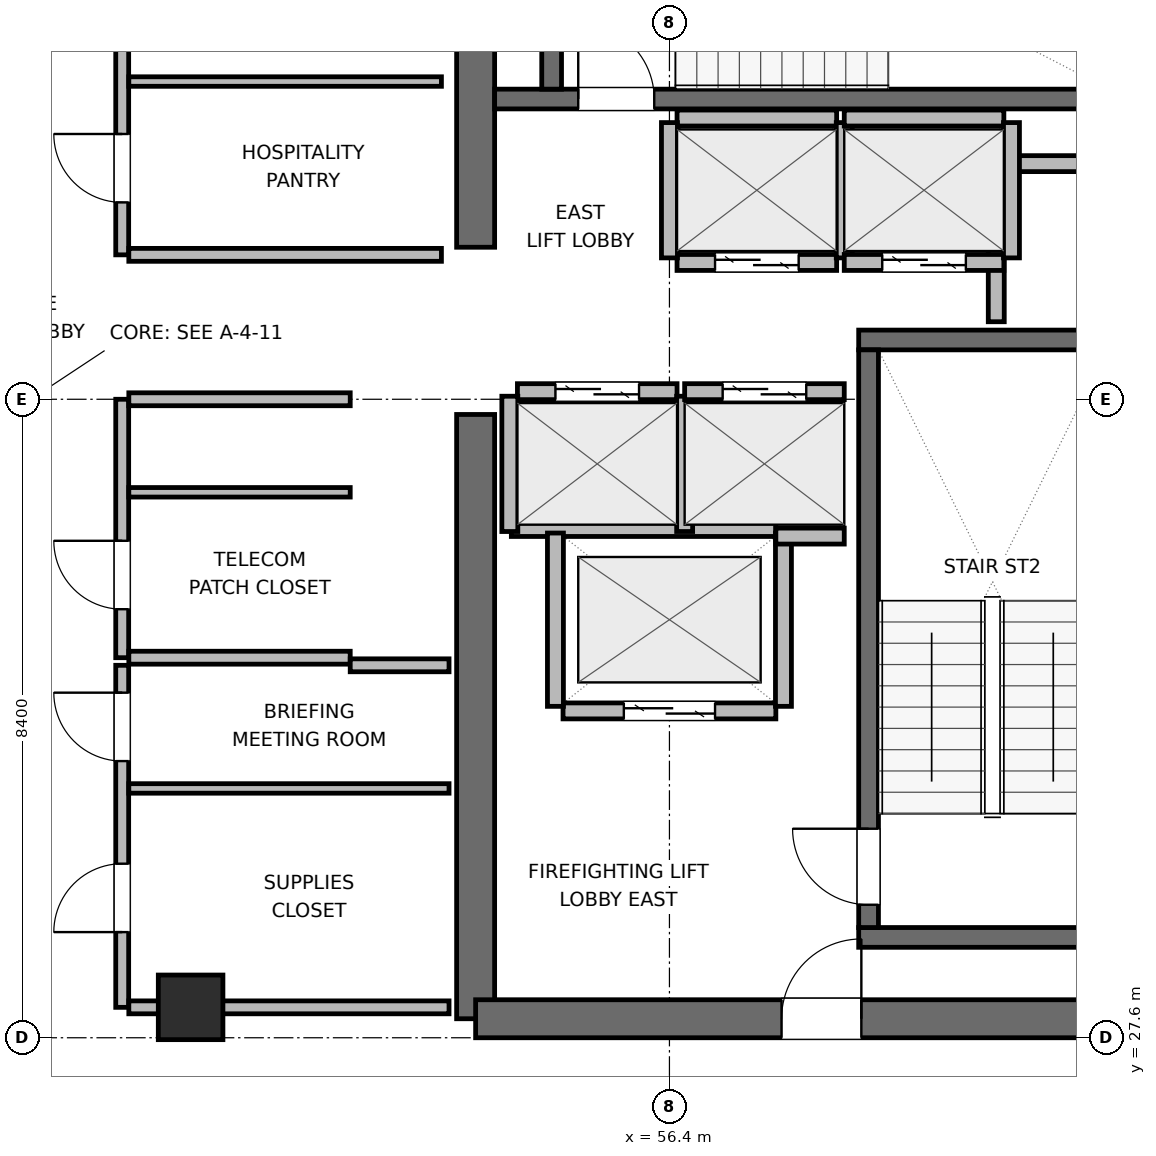
"""IFC4 building model, lengths in metres.
Left out: names, types, materials, properties, quantities, classifications, styles, units other than length and angle.
Written with IfcOpenShell. Run it as: python <this file> out.ifc"""

import sys

from ifc_helpers import new_model, si_unit, direction, frame, frame_2d, origin, origin_2d, place, context, subcontext, project, spatial, rectangle, extrude, element, fill, save


model = new_model("IFC4")
c1 = context("Model", 3, precision=1e-05, world=origin(), true_north=direction((0.0, 1.0)))
c2 = subcontext(c1, "Body", "Model", "MODEL_VIEW")
j1 = project(units=[si_unit("LENGTHUNIT", "METRE"), si_unit("PLANEANGLEUNIT", "RADIAN")], contexts=[c1])
p1 = place(None, origin())
s1 = spatial("IfcSite", under=j1, at=p1, CompositionType="ELEMENT")
p2 = place(p1, origin())
s2 = spatial("IfcBuilding", under=s1, at=p2, CompositionType="ELEMENT")
p3 = place(p2, frame((0.0, 0.0, 274.5)))
s3 = spatial("IfcBuildingStorey", under=s2, at=p3, CompositionType="ELEMENT", Elevation=274.5)
p4 = place(p3, frame((53.85, 27.85, 0.0), z_axis=(0.0, 0.0, 1.0), x_axis=(0.0, 1.0, 0.0)))
e1 = element("IfcWall", 1, at=p4, inside=s3, PredefinedType="SHEAR", context=c2, shape_type="SweptSolid", body=[
    extrude(rectangle(XDim=7.95, YDim=0.5, at=frame_2d((3.975, 0.0))), origin(), (0.0, 0.0, 1.0), 3.9),
])
p5 = place(p3, frame((53.85, 38.0, 0.0), z_axis=(0.0, 0.0, 1.0), x_axis=(0.0, 1.0, 0.0)))
e2 = element("IfcWall", 2, at=p5, inside=s3, PredefinedType="SHEAR", context=c2, shape_type="SweptSolid", body=[
    extrude(rectangle(XDim=6.15, YDim=0.5, at=frame_2d((3.075, 0.0))), origin(), (0.0, 0.0, 1.0), 3.9),
])
p6 = place(p3, frame((53.85, 27.85, 0.0), z_axis=(0.0, 0.0, 1.0), x_axis=(1.0, 0.0, 0.0)))
e3 = element("IfcWall", 3, at=p6, inside=s3, PredefinedType="SHEAR", context=c2, shape_type="SweptSolid", body=[
    extrude(rectangle(XDim=9.5, YDim=0.5, at=frame_2d((4.75, 0.0))), origin(), (0.0, 0.0, 1.0), 3.9),
])
p7 = place(p6, frame((4.025, 0.0, 0.0)))
e4 = element("IfcOpeningElement", 4, at=p7, cuts=e3, PredefinedType="OPENING", context=c2, shape_type="SweptSolid", body=[
    extrude(rectangle(XDim=1.05, YDim=2.04, at=frame_2d((0.525, 1.02))), frame((0.0, 0.26, 0.0), z_axis=(0.0, -1.0, 0.0), x_axis=(1.0, 0.0, 0.0)), (0.0, 0.0, 1.0), 0.52),
])
for number, where, z_axis, x_axis in (
    (5, (58.89, 28.92, 0.0), (0.0, 0.0, 1.0), (1.0, 0.0, 0.0)),
    (6, (58.89, 36.78, 0.0), (0.0, 0.0, 1.0), (1.0, 0.0, 0.0)),
):
    element("IfcWall", number, at=place(p3, frame(where, z_axis=z_axis, x_axis=x_axis)), inside=s3, PredefinedType="SHEAR", context=c2, shape_type="SweptSolid", body=[
        extrude(rectangle(XDim=4.21, YDim=0.26, at=frame_2d((2.105, 0.0))), origin(), (0.0, 0.0, 1.0), 3.9),
    ])
p8 = place(p3, frame((59.02, 29.05, 0.0), z_axis=(0.0, 0.0, 1.0), x_axis=(0.0, 1.0, 0.0)))
e7 = element("IfcWall", 7, at=p8, inside=s3, PredefinedType="SHEAR", context=c2, shape_type="SweptSolid", body=[
    extrude(rectangle(XDim=7.6, YDim=0.26, at=frame_2d((3.8, 0.0))), origin(), (0.0, 0.0, 1.0), 3.9),
])
p9 = place(p8, frame((0.3, 0.0, 0.0)))
e8 = element("IfcOpeningElement", 8, at=p9, cuts=e7, PredefinedType="OPENING", context=c2, shape_type="SweptSolid", body=[
    extrude(rectangle(XDim=1.0, YDim=2.04, at=frame_2d((0.5, 1.02))), frame((0.0, 0.14, 0.0), z_axis=(0.0, -1.0, 0.0), x_axis=(1.0, 0.0, 0.0)), (0.0, 0.0, 1.0), 0.28),
])
p10 = place(p3, frame((54.1, 39.95, 0.0), z_axis=(0.0, 0.0, 1.0), x_axis=(1.0, 0.0, 0.0)))
e9 = element("IfcWall", 9, at=p10, inside=s3, PredefinedType="SHEAR", context=c2, shape_type="SweptSolid", body=[
    extrude(rectangle(XDim=9.0, YDim=0.26, at=frame_2d((4.5, 0.0))), origin(), (0.0, 0.0, 1.0), 3.9),
])
p11 = place(p10, frame((1.1, 0.0, 0.0)))
e10 = element("IfcOpeningElement", 10, at=p11, cuts=e9, PredefinedType="OPENING", context=c2, shape_type="SweptSolid", body=[
    extrude(rectangle(XDim=1.0, YDim=2.04, at=frame_2d((0.5, 1.02))), frame((0.0, 0.14, 0.0), z_axis=(0.0, -1.0, 0.0), x_axis=(1.0, 0.0, 0.0)), (0.0, 0.0, 1.0), 0.28),
])
p12 = place(p3, frame((54.85, 40.08, 0.0), z_axis=(0.0, 0.0, 1.0), x_axis=(0.0, 1.0, 0.0)))
e11 = element("IfcWall", 11, at=p12, inside=s3, PredefinedType="SHEAR", context=c2, shape_type="SweptSolid", body=[
    extrude(rectangle(XDim=2.94, YDim=0.26, at=frame_2d((1.47, 0.0))), origin(), (0.0, 0.0, 1.0), 3.9),
])
p13 = place(p3, frame((50.1, 28.0, 0.0), z_axis=(0.0, 0.0, 1.0), x_axis=(1.0, 0.0, 0.0)))
e12 = element("IfcColumn", 12, at=p13, inside=s3, PredefinedType="COLUMN", context=c2, shape_type="SweptSolid", body=[
    extrude(rectangle(XDim=0.85, YDim=0.85, at=origin_2d()), origin(), (0.0, 0.0, 1.0), 3.9),
])
p14 = place(p3, frame((60.72, 39.1, 0.0), z_axis=(0.0, 0.0, 1.0), x_axis=(1.0, 0.0, 0.0)))
e13 = element("IfcWall", 13, at=p14, inside=s3, PredefinedType="PARTITIONING", context=c2, shape_type="SweptSolid", body=[
    extrude(rectangle(XDim=1.8, YDim=0.21, at=frame_2d((0.9, 0.0))), origin(), (0.0, 0.0, 1.0), 3.68),
])
p15 = place(p3, frame((60.7, 37.02, 0.0), z_axis=(0.0, 0.0, 1.0), x_axis=(0.0, 1.0, 0.0)))
e14 = element("IfcWall", 14, at=p15, inside=s3, PredefinedType="PARTITIONING", context=c2, shape_type="SweptSolid", body=[
    extrude(rectangle(XDim=1.96, YDim=0.21, at=frame_2d((0.98, 0.0))), origin(), (0.0, 0.0, 1.0), 3.68),
])
p16 = place(p3, frame((55.0, 31.9, 0.0), z_axis=(0.0, 0.0, 1.0), x_axis=(1.0, 0.0, 0.0)))
e15 = element("IfcWall", 15, at=p16, inside=s3, PredefinedType="PARTITIONING", context=c2, shape_type="SweptSolid", body=[
    extrude(rectangle(XDim=2.8, YDim=0.21, at=frame_2d((1.4, 0.0))), origin(), (0.0, 0.0, 1.0), 3.68),
])
p17 = place(p16, frame((0.8, 0.0, 0.0)))
e16 = element("IfcOpeningElement", 16, at=p17, cuts=e15, PredefinedType="OPENING", context=c2, shape_type="SweptSolid", body=[
    extrude(rectangle(XDim=1.2, YDim=2.04, at=frame_2d((0.6, 1.02))), frame((0.0, 0.115, 0.0), z_axis=(0.0, -1.0, 0.0), x_axis=(1.0, 0.0, 0.0)), (0.0, 0.0, 1.0), 0.23),
])
p18 = place(p3, frame((54.32, 34.3, 0.0), z_axis=(0.0, 0.0, 1.0), x_axis=(1.0, 0.0, 0.0)))
e17 = element("IfcWall", 17, at=p18, inside=s3, PredefinedType="PARTITIONING", context=c2, shape_type="SweptSolid", body=[
    extrude(rectangle(XDim=3.48, YDim=0.21, at=frame_2d((1.74, 0.0))), origin(), (0.0, 0.0, 1.0), 3.68),
])
for number, where, z_axis, x_axis in (
    (18, (54.9, 31.96, 0.0), (0.0, 0.0, 1.0), (0.0, 1.0, 0.0)),
    (19, (57.9, 31.96, 0.0), (0.0, 0.0, 1.0), (0.0, 1.0, 0.0)),
):
    element("IfcWall", number, at=place(p3, frame(where, z_axis=z_axis, x_axis=x_axis)), inside=s3, PredefinedType="PARTITIONING", context=c2, shape_type="SweptSolid", body=[
        extrude(rectangle(XDim=2.28, YDim=0.21, at=frame_2d((1.14, 0.0))), origin(), (0.0, 0.0, 1.0), 3.68),
    ])
p19 = place(p3, frame((54.4, 36.1, 0.0), z_axis=(0.0, 0.0, 1.0), x_axis=(1.0, 0.0, 0.0)))
e20 = element("IfcWall", 20, at=p19, inside=s3, PredefinedType="PARTITIONING", context=c2, shape_type="SweptSolid", body=[
    extrude(rectangle(XDim=2.1, YDim=0.21, at=frame_2d((1.05, 0.0))), origin(), (0.0, 0.0, 1.0), 3.68),
])
p20 = place(p19, frame((0.5, 0.0, 0.0)))
e21 = element("IfcOpeningElement", 21, at=p20, cuts=e20, PredefinedType="OPENING", context=c2, shape_type="SweptSolid", body=[
    extrude(rectangle(XDim=1.1, YDim=2.04, at=frame_2d((0.55, 1.02))), frame((0.0, 0.115, 0.0), z_axis=(0.0, -1.0, 0.0), x_axis=(1.0, 0.0, 0.0)), (0.0, 0.0, 1.0), 0.23),
])
for number, where, z_axis, x_axis in (
    (22, (54.3, 34.26, 0.0), (0.0, 0.0, 1.0), (0.0, 1.0, 0.0)),
    (23, (56.6, 34.26, 0.0), (0.0, 0.0, 1.0), (0.0, 1.0, 0.0)),
):
    element("IfcWall", number, at=place(p3, frame(where, z_axis=z_axis, x_axis=x_axis)), inside=s3, PredefinedType="PARTITIONING", context=c2, shape_type="SweptSolid", body=[
        extrude(rectangle(XDim=1.78, YDim=0.21, at=frame_2d((0.89, 0.0))), origin(), (0.0, 0.0, 1.0), 3.68),
    ])
p21 = place(p3, frame((56.6, 36.1, 0.0), z_axis=(0.0, 0.0, 1.0), x_axis=(1.0, 0.0, 0.0)))
e24 = element("IfcWall", 24, at=p21, inside=s3, PredefinedType="PARTITIONING", context=c2, shape_type="SweptSolid", body=[
    extrude(rectangle(XDim=2.1, YDim=0.21, at=frame_2d((1.05, 0.0))), origin(), (0.0, 0.0, 1.0), 3.68),
])
p22 = place(p21, frame((0.5, 0.0, 0.0)))
e25 = element("IfcOpeningElement", 25, at=p22, cuts=e24, PredefinedType="OPENING", context=c2, shape_type="SweptSolid", body=[
    extrude(rectangle(XDim=1.1, YDim=2.04, at=frame_2d((0.55, 1.02))), frame((0.0, 0.115, 0.0), z_axis=(0.0, -1.0, 0.0), x_axis=(1.0, 0.0, 0.0)), (0.0, 0.0, 1.0), 0.23),
])
p23 = place(p3, frame((57.8, 34.2, 0.0), z_axis=(0.0, 0.0, 1.0), x_axis=(1.0, 0.0, 0.0)))
e26 = element("IfcWall", 26, at=p23, inside=s3, PredefinedType="PARTITIONING", context=c2, shape_type="SweptSolid", body=[
    extrude(rectangle(XDim=0.9, YDim=0.21, at=frame_2d((0.45, 0.0))), origin(), (0.0, 0.0, 1.0), 3.68),
])
p24 = place(p3, frame((56.5, 37.8, 0.0), z_axis=(0.0, 0.0, 1.0), x_axis=(1.0, 0.0, 0.0)))
e27 = element("IfcWall", 27, at=p24, inside=s3, PredefinedType="PARTITIONING", context=c2, shape_type="SweptSolid", body=[
    extrude(rectangle(XDim=2.1, YDim=0.21, at=frame_2d((1.05, 0.0))), origin(), (0.0, 0.0, 1.0), 3.68),
])
p25 = place(p24, frame((0.5, 0.0, 0.0)))
e28 = element("IfcOpeningElement", 28, at=p25, cuts=e27, PredefinedType="OPENING", context=c2, shape_type="SweptSolid", body=[
    extrude(rectangle(XDim=1.1, YDim=2.04, at=frame_2d((0.55, 1.02))), frame((0.0, 0.115, 0.0), z_axis=(0.0, -1.0, 0.0), x_axis=(1.0, 0.0, 0.0)), (0.0, 0.0, 1.0), 0.23),
])
p26 = place(p3, frame((56.5, 39.7, 0.0), z_axis=(0.0, 0.0, 1.0), x_axis=(1.0, 0.0, 0.0)))
e29 = element("IfcWall", 29, at=p26, inside=s3, PredefinedType="PARTITIONING", context=c2, shape_type="SweptSolid", body=[
    extrude(rectangle(XDim=2.1, YDim=0.21, at=frame_2d((1.05, 0.0))), origin(), (0.0, 0.0, 1.0), 3.68),
])
for number, where, z_axis, x_axis in (
    (30, (56.4, 37.86, 0.0), (0.0, 0.0, 1.0), (0.0, 1.0, 0.0)),
    (31, (58.7, 37.86, 0.0), (0.0, 0.0, 1.0), (0.0, 1.0, 0.0)),
):
    element("IfcWall", number, at=place(p3, frame(where, z_axis=z_axis, x_axis=x_axis)), inside=s3, PredefinedType="PARTITIONING", context=c2, shape_type="SweptSolid", body=[
        extrude(rectangle(XDim=1.78, YDim=0.21, at=frame_2d((0.89, 0.0))), origin(), (0.0, 0.0, 1.0), 3.68),
    ])
p27 = place(p3, frame((58.7, 37.8, 0.0), z_axis=(0.0, 0.0, 1.0), x_axis=(1.0, 0.0, 0.0)))
e32 = element("IfcWall", 32, at=p27, inside=s3, PredefinedType="PARTITIONING", context=c2, shape_type="SweptSolid", body=[
    extrude(rectangle(XDim=2.1, YDim=0.21, at=frame_2d((1.05, 0.0))), origin(), (0.0, 0.0, 1.0), 3.68),
])
p28 = place(p27, frame((0.5, 0.0, 0.0)))
e33 = element("IfcOpeningElement", 33, at=p28, cuts=e32, PredefinedType="OPENING", context=c2, shape_type="SweptSolid", body=[
    extrude(rectangle(XDim=1.1, YDim=2.04, at=frame_2d((0.55, 1.02))), frame((0.0, 0.115, 0.0), z_axis=(0.0, -1.0, 0.0), x_axis=(1.0, 0.0, 0.0)), (0.0, 0.0, 1.0), 0.23),
])
p29 = place(p3, frame((58.7, 39.7, 0.0), z_axis=(0.0, 0.0, 1.0), x_axis=(1.0, 0.0, 0.0)))
e34 = element("IfcWall", 34, at=p29, inside=s3, PredefinedType="PARTITIONING", context=c2, shape_type="SweptSolid", body=[
    extrude(rectangle(XDim=2.1, YDim=0.21, at=frame_2d((1.05, 0.0))), origin(), (0.0, 0.0, 1.0), 3.68),
])
p30 = place(p3, frame((60.9, 37.86, 0.0), z_axis=(0.0, 0.0, 1.0), x_axis=(0.0, 1.0, 0.0)))
e35 = element("IfcWall", 35, at=p30, inside=s3, PredefinedType="PARTITIONING", context=c2, shape_type="SweptSolid", body=[
    extrude(rectangle(XDim=1.78, YDim=0.21, at=frame_2d((0.89, 0.0))), origin(), (0.0, 0.0, 1.0), 3.68),
])
p31 = place(p3, frame((49.2, 32.6, 0.0), z_axis=(0.0, 0.0, 1.0), x_axis=(0.0, 1.0, 0.0)))
e36 = element("IfcWall", 36, at=p31, inside=s3, PredefinedType="PARTITIONING", context=c2, shape_type="SweptSolid", body=[
    extrude(rectangle(XDim=3.4, YDim=0.17, at=frame_2d((1.7, 0.0))), origin(), (0.0, 0.0, 1.0), 3.68),
])
p32 = place(p31, frame((0.638, 0.0, 0.0)))
e37 = element("IfcOpeningElement", 37, at=p32, cuts=e36, PredefinedType="OPENING", context=c2, shape_type="SweptSolid", body=[
    extrude(rectangle(XDim=0.9, YDim=2.02, at=frame_2d((0.45, 1.01))), frame((0.0, 0.095, 0.0), z_axis=(0.0, -1.0, 0.0), x_axis=(1.0, 0.0, 0.0)), (0.0, 0.0, 1.0), 0.19),
])
for number, where, z_axis, x_axis in (
    (38, (49.287, 32.6, 0.0), (0.0, 0.0, 1.0), (1.0, 0.0, 0.0)),
    (39, (49.287, 36.0, 0.0), (0.0, 0.0, 1.0), (1.0, 0.0, 0.0)),
):
    element("IfcWall", number, at=place(p3, frame(where, z_axis=z_axis, x_axis=x_axis)), inside=s3, PredefinedType="PARTITIONING", context=c2, shape_type="SweptSolid", body=[
        extrude(rectangle(XDim=2.913, YDim=0.17, at=frame_2d((1.457, 0.0))), origin(), (0.0, 0.0, 1.0), 3.68),
    ])
p33 = place(p3, frame((49.287, 34.776, 0.0), z_axis=(0.0, 0.0, 1.0), x_axis=(1.0, 0.0, 0.0)))
e40 = element("IfcWall", 40, at=p33, inside=s3, PredefinedType="PARTITIONING", context=c2, shape_type="SweptSolid", body=[
    extrude(rectangle(XDim=2.913, YDim=0.125, at=frame_2d((1.457, 0.0))), origin(), (0.0, 0.0, 1.0), 3.68),
])
p34 = place(p3, frame((49.2, 28.0, 0.0), z_axis=(0.0, 0.0, 1.0), x_axis=(0.0, 1.0, 0.0)))
e41 = element("IfcWall", 41, at=p34, inside=s3, PredefinedType="PARTITIONING", context=c2, shape_type="SweptSolid", body=[
    extrude(rectangle(XDim=4.5, YDim=0.17, at=frame_2d((2.25, 0.0))), origin(), (0.0, 0.0, 1.0), 3.68),
])
p35 = place(p34, frame((0.99, 0.0, 0.0)))
e42 = element("IfcOpeningElement", 42, at=p35, cuts=e41, PredefinedType="OPENING", context=c2, shape_type="SweptSolid", body=[
    extrude(rectangle(XDim=0.9, YDim=2.02, at=frame_2d((0.45, 1.01))), frame((0.0, 0.095, 0.0), z_axis=(0.0, -1.0, 0.0), x_axis=(1.0, 0.0, 0.0)), (0.0, 0.0, 1.0), 0.19),
])
p36 = place(p34, frame((3.24, 0.0, 0.0)))
e43 = element("IfcOpeningElement", 43, at=p36, cuts=e41, PredefinedType="OPENING", context=c2, shape_type="SweptSolid", body=[
    extrude(rectangle(XDim=0.9, YDim=2.02, at=frame_2d((0.45, 1.01))), frame((0.0, 0.095, 0.0), z_axis=(0.0, -1.0, 0.0), x_axis=(1.0, 0.0, 0.0)), (0.0, 0.0, 1.0), 0.19),
])
p37 = place(p3, frame((49.287, 28.0, 0.0), z_axis=(0.0, 0.0, 1.0), x_axis=(1.0, 0.0, 0.0)))
e44 = element("IfcWall", 44, at=p37, inside=s3, PredefinedType="PARTITIONING", context=c2, shape_type="SweptSolid", body=[
    extrude(rectangle(XDim=4.213, YDim=0.17, at=frame_2d((2.106, 0.0))), origin(), (0.0, 0.0, 1.0), 2.765),
])
p38 = place(p3, frame((52.2, 32.5, 0.0), z_axis=(0.0, 0.0, 1.0), x_axis=(1.0, 0.0, 0.0)))
e45 = element("IfcWall", 45, at=p38, inside=s3, PredefinedType="PARTITIONING", context=c2, shape_type="SweptSolid", body=[
    extrude(rectangle(XDim=1.3, YDim=0.17, at=frame_2d((0.65, 0.0))), origin(), (0.0, 0.0, 1.0), 3.68),
])
p39 = place(p3, frame((49.287, 30.88, 0.0), z_axis=(0.0, 0.0, 1.0), x_axis=(1.0, 0.0, 0.0)))
e46 = element("IfcWall", 46, at=p39, inside=s3, PredefinedType="PARTITIONING", context=c2, shape_type="SweptSolid", body=[
    extrude(rectangle(XDim=4.213, YDim=0.125, at=frame_2d((2.106, 0.0))), origin(), (0.0, 0.0, 1.0), 3.68),
])
p40 = place(p3, frame((49.2, 37.9, 0.0), z_axis=(0.0, 0.0, 1.0), x_axis=(0.0, 1.0, 0.0)))
e47 = element("IfcWall", 47, at=p40, inside=s3, PredefinedType="PARTITIONING", context=c2, shape_type="SweptSolid", body=[
    extrude(rectangle(XDim=6.0, YDim=0.17, at=frame_2d((3.0, 0.0))), origin(), (0.0, 0.0, 1.0), 3.68),
])
p41 = place(p40, frame((0.69, 0.0, 0.0)))
e48 = element("IfcOpeningElement", 48, at=p41, cuts=e47, PredefinedType="OPENING", context=c2, shape_type="SweptSolid", body=[
    extrude(rectangle(XDim=0.9, YDim=2.02, at=frame_2d((0.45, 1.01))), frame((0.0, 0.095, 0.0), z_axis=(0.0, -1.0, 0.0), x_axis=(1.0, 0.0, 0.0)), (0.0, 0.0, 1.0), 0.19),
])
p42 = place(p40, frame((3.69, 0.0, 0.0)))
e49 = element("IfcOpeningElement", 49, at=p42, cuts=e47, PredefinedType="OPENING", context=c2, shape_type="SweptSolid", body=[
    extrude(rectangle(XDim=0.9, YDim=2.02, at=frame_2d((0.45, 1.01))), frame((0.0, 0.095, 0.0), z_axis=(0.0, -1.0, 0.0), x_axis=(1.0, 0.0, 0.0)), (0.0, 0.0, 1.0), 0.19),
])
p43 = place(p3, frame((49.287, 37.9, 0.0), z_axis=(0.0, 0.0, 1.0), x_axis=(1.0, 0.0, 0.0)))
e50 = element("IfcWall", 50, at=p43, inside=s3, PredefinedType="PARTITIONING", context=c2, shape_type="SweptSolid", body=[
    extrude(rectangle(XDim=4.113, YDim=0.17, at=frame_2d((2.056, 0.0))), origin(), (0.0, 0.0, 1.0), 3.68),
])
p44 = place(p3, frame((49.287, 40.18, 0.0), z_axis=(0.0, 0.0, 1.0), x_axis=(1.0, 0.0, 0.0)))
e51 = element("IfcWall", 51, at=p44, inside=s3, PredefinedType="PARTITIONING", context=c2, shape_type="SweptSolid", body=[
    extrude(rectangle(XDim=4.113, YDim=0.125, at=frame_2d((2.056, 0.0))), origin(), (0.0, 0.0, 1.0), 3.68),
])
p45 = place(p9, origin())
e52 = element("IfcDoor", 52, at=p45, inside=s3, OperationType="SINGLE_SWING_RIGHT", PredefinedType="DOOR", context=c2, shape_type="SweptSolid", body=[
    extrude(rectangle(XDim=1.0, YDim=2.04, at=frame_2d((0.5, 1.02))), frame((0.0, 0.025, 0.0), z_axis=(0.0, -1.0, 0.0), x_axis=(1.0, 0.0, 0.0)), (0.0, 0.0, 1.0), 0.05),
])
fill(e8, e52)
p46 = place(p11, origin())
e53 = element("IfcDoor", 53, at=p46, inside=s3, OperationType="SINGLE_SWING_LEFT", PredefinedType="DOOR", context=c2, shape_type="SweptSolid", body=[
    extrude(rectangle(XDim=1.0, YDim=2.04, at=frame_2d((0.5, 1.02))), frame((0.0, 0.025, 0.0), z_axis=(0.0, -1.0, 0.0), x_axis=(1.0, 0.0, 0.0)), (0.0, 0.0, 1.0), 0.05),
])
fill(e10, e53)
p47 = place(p17, origin())
e54 = element("IfcDoor", 54, at=p47, inside=s3, OperationType="DOUBLE_DOOR_SLIDING", PredefinedType="DOOR", context=c2, shape_type="SweptSolid", body=[
    extrude(rectangle(XDim=1.2, YDim=2.04, at=frame_2d((0.6, 1.02))), frame((0.0, 0.025, 0.0), z_axis=(0.0, -1.0, 0.0), x_axis=(1.0, 0.0, 0.0)), (0.0, 0.0, 1.0), 0.05),
])
fill(e16, e54)
p48 = place(p20, origin())
e55 = element("IfcDoor", 55, at=p48, inside=s3, OperationType="DOUBLE_DOOR_SLIDING", PredefinedType="DOOR", context=c2, shape_type="SweptSolid", body=[
    extrude(rectangle(XDim=1.1, YDim=2.04, at=frame_2d((0.55, 1.02))), frame((0.0, 0.025, 0.0), z_axis=(0.0, -1.0, 0.0), x_axis=(1.0, 0.0, 0.0)), (0.0, 0.0, 1.0), 0.05),
])
fill(e21, e55)
p49 = place(p22, origin())
e56 = element("IfcDoor", 56, at=p49, inside=s3, OperationType="DOUBLE_DOOR_SLIDING", PredefinedType="DOOR", context=c2, shape_type="SweptSolid", body=[
    extrude(rectangle(XDim=1.1, YDim=2.04, at=frame_2d((0.55, 1.02))), frame((0.0, 0.025, 0.0), z_axis=(0.0, -1.0, 0.0), x_axis=(1.0, 0.0, 0.0)), (0.0, 0.0, 1.0), 0.05),
])
fill(e25, e56)
p50 = place(p25, origin())
e57 = element("IfcDoor", 57, at=p50, inside=s3, OperationType="DOUBLE_DOOR_SLIDING", PredefinedType="DOOR", context=c2, shape_type="SweptSolid", body=[
    extrude(rectangle(XDim=1.1, YDim=2.04, at=frame_2d((0.55, 1.02))), frame((0.0, 0.025, 0.0), z_axis=(0.0, -1.0, 0.0), x_axis=(1.0, 0.0, 0.0)), (0.0, 0.0, 1.0), 0.05),
])
fill(e28, e57)
p51 = place(p28, origin())
e58 = element("IfcDoor", 58, at=p51, inside=s3, OperationType="DOUBLE_DOOR_SLIDING", PredefinedType="DOOR", context=c2, shape_type="SweptSolid", body=[
    extrude(rectangle(XDim=1.1, YDim=2.04, at=frame_2d((0.55, 1.02))), frame((0.0, 0.025, 0.0), z_axis=(0.0, -1.0, 0.0), x_axis=(1.0, 0.0, 0.0)), (0.0, 0.0, 1.0), 0.05),
])
fill(e33, e58)
p52 = place(p7, origin())
e59 = element("IfcDoor", 59, at=p52, inside=s3, OperationType="SINGLE_SWING_RIGHT", PredefinedType="DOOR", context=c2, shape_type="SweptSolid", body=[
    extrude(rectangle(XDim=1.05, YDim=2.04, at=frame_2d((0.525, 1.02))), frame((0.0, 0.025, 0.0), z_axis=(0.0, -1.0, 0.0), x_axis=(1.0, 0.0, 0.0)), (0.0, 0.0, 1.0), 0.05),
])
fill(e4, e59)
p53 = place(p32, origin())
e60 = element("IfcDoor", 60, at=p53, inside=s3, OperationType="SINGLE_SWING_RIGHT", PredefinedType="DOOR", context=c2, shape_type="SweptSolid", body=[
    extrude(rectangle(XDim=0.9, YDim=2.02, at=frame_2d((0.45, 1.01))), frame((0.0, 0.025, 0.0), z_axis=(0.0, -1.0, 0.0), x_axis=(1.0, 0.0, 0.0)), (0.0, 0.0, 1.0), 0.05),
])
fill(e37, e60)
p54 = place(p35, origin())
e61 = element("IfcDoor", 61, at=p54, inside=s3, OperationType="SINGLE_SWING_LEFT", PredefinedType="DOOR", context=c2, shape_type="SweptSolid", body=[
    extrude(rectangle(XDim=0.9, YDim=2.02, at=frame_2d((0.45, 1.01))), frame((0.0, 0.025, 0.0), z_axis=(0.0, -1.0, 0.0), x_axis=(1.0, 0.0, 0.0)), (0.0, 0.0, 1.0), 0.05),
])
fill(e42, e61)
p55 = place(p36, origin())
e62 = element("IfcDoor", 62, at=p55, inside=s3, OperationType="SINGLE_SWING_RIGHT", PredefinedType="DOOR", context=c2, shape_type="SweptSolid", body=[
    extrude(rectangle(XDim=0.9, YDim=2.02, at=frame_2d((0.45, 1.01))), frame((0.0, 0.025, 0.0), z_axis=(0.0, -1.0, 0.0), x_axis=(1.0, 0.0, 0.0)), (0.0, 0.0, 1.0), 0.05),
])
fill(e43, e62)
p56 = place(p41, origin())
e63 = element("IfcDoor", 63, at=p56, inside=s3, OperationType="SINGLE_SWING_RIGHT", PredefinedType="DOOR", context=c2, shape_type="SweptSolid", body=[
    extrude(rectangle(XDim=0.9, YDim=2.02, at=frame_2d((0.45, 1.01))), frame((0.0, 0.025, 0.0), z_axis=(0.0, -1.0, 0.0), x_axis=(1.0, 0.0, 0.0)), (0.0, 0.0, 1.0), 0.05),
])
fill(e48, e63)
save(model, sys.argv[1])
